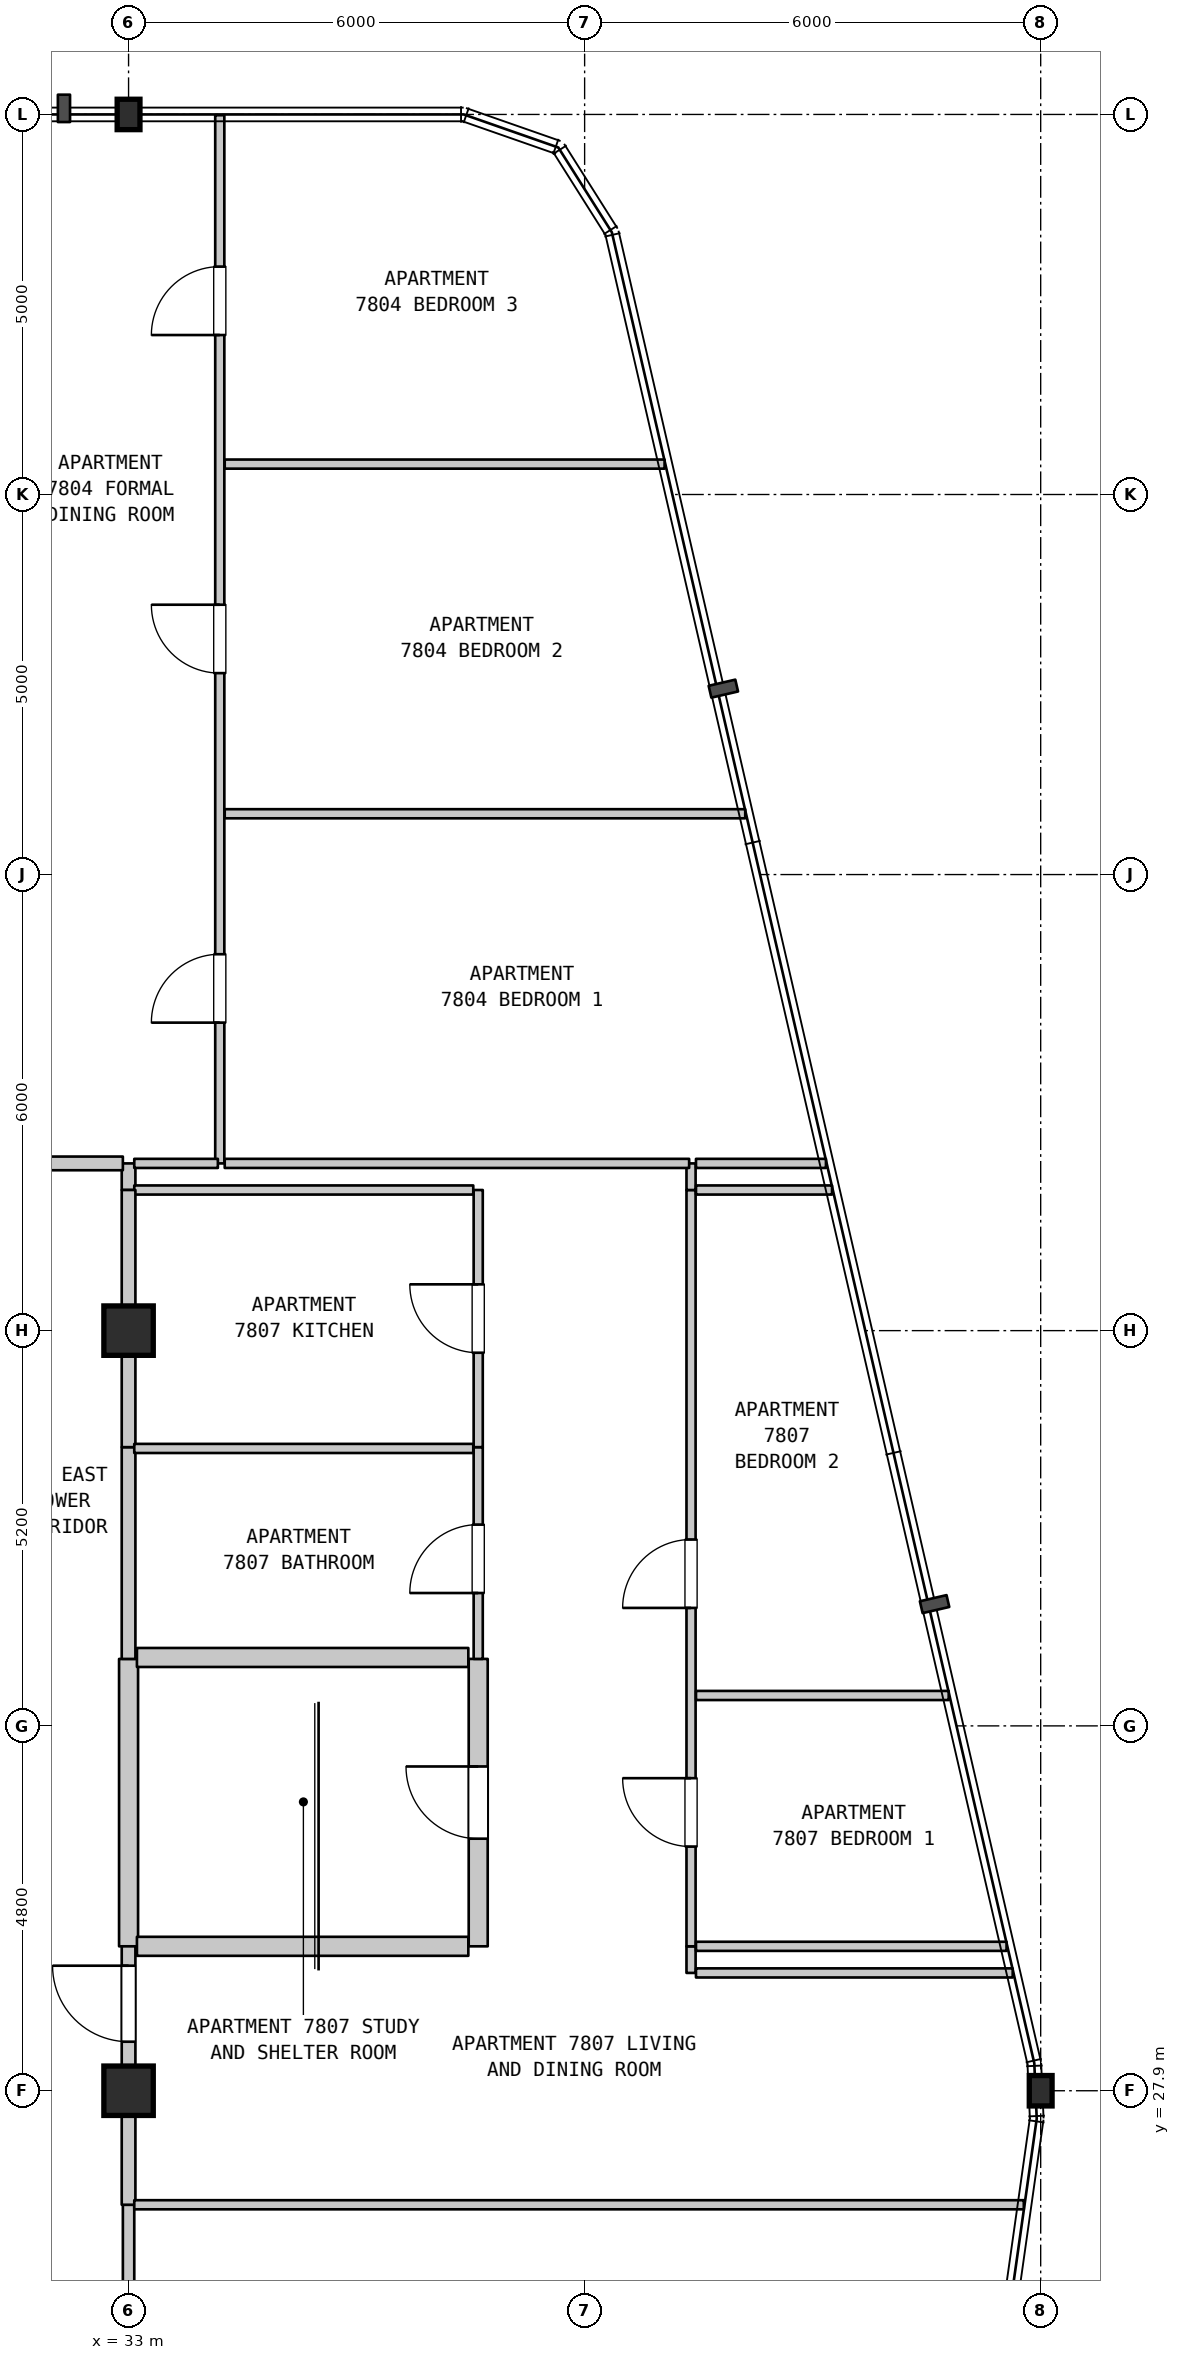
"""IFC4 building model, lengths in metres.
Left out: names, types, materials, properties, quantities, classifications, styles, units other than length and angle.
Written with IfcOpenShell. Run it as: python <this file> out.ifc"""

import sys

from ifc_helpers import new_model, si_unit, direction, frame, frame_2d, origin, origin_2d, place, context, subcontext, project, spatial, rectangle, i_section, extrude, element, fill, save


model = new_model("IFC4")
c1 = context("Model", 3, precision=1e-05, world=origin(), true_north=direction((0.0, 1.0)))
c2 = subcontext(c1, "Body", "Model", "MODEL_VIEW")
j1 = project(units=[si_unit("LENGTHUNIT", "METRE"), si_unit("PLANEANGLEUNIT", "RADIAN")], contexts=[c1])
p1 = place(None, origin())
s1 = spatial("IfcSite", under=j1, at=p1, CompositionType="ELEMENT")
p2 = place(p1, origin())
s2 = spatial("IfcBuilding", under=s1, at=p2, CompositionType="ELEMENT")
p3 = place(p2, frame((0.0, 0.0, 311.0)))
s3 = spatial("IfcBuildingStorey", under=s2, at=p3, CompositionType="ELEMENT", Elevation=311.0)
for number, where, z_axis, x_axis in (
    (1, (33.0, 27.9, 0.0), (0.0, 0.0, 1.0), (1.0, 0.0, 0.0)),
    (2, (33.0, 37.9, 0.0), (0.0, 0.0, 1.0), (1.0, 0.0, 0.0)),
):
    element("IfcColumn", number, at=place(p3, frame(where, z_axis=z_axis, x_axis=x_axis)), inside=s3, PredefinedType="COLUMN", context=c2, shape_type="SweptSolid", body=[
        extrude(rectangle(XDim=0.65, YDim=0.65, at=origin_2d()), origin(), (0.0, 0.0, 1.0), 3.7),
    ])
for number, where, z_axis, x_axis in (
    (3, (33.0, 53.9, 0.0), (0.0, 0.0, 1.0), (1.0, 0.0, 0.0)),
    (4, (45.0, 27.9, 0.0), (0.0, 0.0, 1.0), (1.0, 0.0, 0.0)),
):
    element("IfcColumn", number, at=place(p3, frame(where, z_axis=z_axis, x_axis=x_axis)), inside=s3, PredefinedType="COLUMN", context=c2, shape_type="SweptSolid", body=[
        extrude(i_section(OverallWidth=0.3, OverallDepth=0.4, WebThickness=0.013, FlangeThickness=0.024, FilletRadius=0.027, at=origin_2d()), origin(), (0.0, 0.0, 1.0), 3.7),
    ])
p4 = place(p3, frame((33.0, 19.5, 0.0), z_axis=(0.0, 0.0, 1.0), x_axis=(0.0, 1.0, 0.0)))
e5 = element("IfcWall", 5, at=p4, inside=s3, PredefinedType="STANDARD", context=c2, shape_type="SweptSolid", body=[
    extrude(rectangle(XDim=6.9, YDim=0.15, at=frame_2d((3.45, 0.0))), origin(), (0.0, 0.0, 1.0), 2.99),
])
p5 = place(p4, frame((3.944, 0.0, 0.0)))
e6 = element("IfcOpeningElement", 6, at=p5, cuts=e5, PredefinedType="OPENING", context=c2, shape_type="SweptSolid", body=[
    extrude(rectangle(XDim=1.0, YDim=2.15, at=frame_2d((0.5, 1.075))), frame((0.0, 0.085, 0.0), z_axis=(0.0, -1.0, 0.0), x_axis=(1.0, 0.0, 0.0)), (0.0, 0.0, 1.0), 0.17),
])
p6 = place(p3, frame((33.0, 26.4, 0.0), z_axis=(0.0, 0.0, 1.0), x_axis=(0.0, 1.0, 0.0)))
e7 = element("IfcWall", 7, at=p6, inside=s3, PredefinedType="STANDARD", context=c2, shape_type="SweptSolid", body=[
    extrude(rectangle(XDim=1.5, YDim=0.18, at=frame_2d((0.75, 0.0))), origin(), (0.0, 0.0, 1.0), 2.99),
])
p7 = place(p3, frame((33.0, 29.8, 0.0), z_axis=(0.0, 0.0, 1.0), x_axis=(0.0, 1.0, 0.0)))
e8 = element("IfcWall", 8, at=p7, inside=s3, PredefinedType="STANDARD", context=c2, shape_type="SweptSolid", body=[
    extrude(rectangle(XDim=3.781, YDim=0.25, at=frame_2d((1.891, 0.0))), origin(), (0.0, 0.0, 1.0), 2.78),
])
p8 = place(p3, frame((33.0, 33.581, 0.0), z_axis=(0.0, 0.0, 1.0), x_axis=(0.0, 1.0, 0.0)))
e9 = element("IfcWall", 9, at=p8, inside=s3, PredefinedType="STANDARD", context=c2, shape_type="SweptSolid", body=[
    extrude(rectangle(XDim=2.786, YDim=0.18, at=frame_2d((1.393, 0.0))), origin(), (0.0, 0.0, 1.0), 2.78),
])
p9 = place(p3, frame((33.0, 36.367, 0.0), z_axis=(0.0, 0.0, 1.0), x_axis=(0.0, 1.0, 0.0)))
e10 = element("IfcWall", 10, at=p9, inside=s3, PredefinedType="STANDARD", context=c2, shape_type="SweptSolid", body=[
    extrude(rectangle(XDim=1.533, YDim=0.18, at=frame_2d((0.767, 0.0))), origin(), (0.0, 0.0, 1.0), 2.78),
])
p10 = place(p3, frame((33.0, 39.75, 0.0), z_axis=(0.0, 0.0, 1.0), x_axis=(0.0, 1.0, 0.0)))
e11 = element("IfcWall", 11, at=p10, inside=s3, PredefinedType="STANDARD", context=c2, shape_type="SweptSolid", body=[
    extrude(rectangle(XDim=0.35, YDim=0.18, at=frame_2d((0.175, 0.0))), origin(), (0.0, 0.0, 1.0), 3.28),
])
p11 = place(p3, frame((34.2, 40.1, 0.0), z_axis=(0.0, 0.0, 1.0), x_axis=(0.0, 1.0, 0.0)))
e12 = element("IfcWall", 12, at=p11, inside=s3, PredefinedType="PARTITIONING", context=c2, shape_type="SweptSolid", body=[
    extrude(rectangle(XDim=13.79, YDim=0.12, at=frame_2d((6.895, 0.0))), origin(), (0.0, 0.0, 1.0), 3.28),
])
p12 = place(p11, frame((1.852, 0.0, 0.0)))
e13 = element("IfcOpeningElement", 13, at=p12, cuts=e12, PredefinedType="OPENING", context=c2, shape_type="SweptSolid", body=[
    extrude(rectangle(XDim=0.9, YDim=2.15, at=frame_2d((0.45, 1.075))), frame((0.0, 0.07, 0.0), z_axis=(0.0, -1.0, 0.0), x_axis=(1.0, 0.0, 0.0)), (0.0, 0.0, 1.0), 0.14),
])
p13 = place(p11, frame((6.45, 0.0, 0.0)))
e14 = element("IfcOpeningElement", 14, at=p13, cuts=e12, PredefinedType="OPENING", context=c2, shape_type="SweptSolid", body=[
    extrude(rectangle(XDim=0.9, YDim=2.15, at=frame_2d((0.45, 1.075))), frame((0.0, 0.07, 0.0), z_axis=(0.0, -1.0, 0.0), x_axis=(1.0, 0.0, 0.0)), (0.0, 0.0, 1.0), 0.14),
])
p14 = place(p11, frame((10.898, 0.0, 0.0)))
e15 = element("IfcOpeningElement", 15, at=p14, cuts=e12, PredefinedType="OPENING", context=c2, shape_type="SweptSolid", body=[
    extrude(rectangle(XDim=0.9, YDim=2.15, at=frame_2d((0.45, 1.075))), frame((0.0, 0.07, 0.0), z_axis=(0.0, -1.0, 0.0), x_axis=(1.0, 0.0, 0.0)), (0.0, 0.0, 1.0), 0.14),
])
p15 = place(p3, frame((37.6, 29.8, 0.0), z_axis=(0.0, 0.0, 1.0), x_axis=(0.0, 1.0, 0.0)))
e16 = element("IfcWall", 16, at=p15, inside=s3, PredefinedType="STANDARD", context=c2, shape_type="SweptSolid", body=[
    extrude(rectangle(XDim=3.781, YDim=0.25, at=frame_2d((1.891, 0.0))), origin(), (0.0, 0.0, 1.0), 3.28),
])
p16 = place(p15, frame((1.416, 0.0, 0.0)))
e17 = element("IfcOpeningElement", 17, at=p16, cuts=e16, PredefinedType="OPENING", context=c2, shape_type="SweptSolid", body=[
    extrude(rectangle(XDim=0.95, YDim=2.15, at=frame_2d((0.475, 1.075))), frame((0.0, 0.135, 0.0), z_axis=(0.0, -1.0, 0.0), x_axis=(1.0, 0.0, 0.0)), (0.0, 0.0, 1.0), 0.27),
])
p17 = place(p3, frame((37.6, 33.581, 0.0), z_axis=(0.0, 0.0, 1.0), x_axis=(0.0, 1.0, 0.0)))
e18 = element("IfcWall", 18, at=p17, inside=s3, PredefinedType="PARTITIONING", context=c2, shape_type="SweptSolid", body=[
    extrude(rectangle(XDim=2.786, YDim=0.12, at=frame_2d((1.393, 0.0))), origin(), (0.0, 0.0, 1.0), 3.28),
])
p18 = place(p17, frame((0.867, 0.0, 0.0)))
e19 = element("IfcOpeningElement", 19, at=p18, cuts=e18, PredefinedType="OPENING", context=c2, shape_type="SweptSolid", body=[
    extrude(rectangle(XDim=0.9, YDim=2.1, at=frame_2d((0.45, 1.05))), frame((0.0, 0.07, 0.0), z_axis=(0.0, -1.0, 0.0), x_axis=(1.0, 0.0, 0.0)), (0.0, 0.0, 1.0), 0.14),
])
p19 = place(p3, frame((37.6, 36.367, 0.0), z_axis=(0.0, 0.0, 1.0), x_axis=(0.0, 1.0, 0.0)))
e20 = element("IfcWall", 20, at=p19, inside=s3, PredefinedType="PARTITIONING", context=c2, shape_type="SweptSolid", body=[
    extrude(rectangle(XDim=3.383, YDim=0.12, at=frame_2d((1.691, 0.0))), origin(), (0.0, 0.0, 1.0), 3.28),
])
p20 = place(p19, frame((1.242, 0.0, 0.0)))
e21 = element("IfcOpeningElement", 21, at=p20, cuts=e20, PredefinedType="OPENING", context=c2, shape_type="SweptSolid", body=[
    extrude(rectangle(XDim=0.9, YDim=2.15, at=frame_2d((0.45, 1.075))), frame((0.0, 0.07, 0.0), z_axis=(0.0, -1.0, 0.0), x_axis=(1.0, 0.0, 0.0)), (0.0, 0.0, 1.0), 0.14),
])
p21 = place(p3, frame((40.4, 29.45, 0.0), z_axis=(0.0, 0.0, 1.0), x_axis=(0.0, 1.0, 0.0)))
e22 = element("IfcWall", 22, at=p21, inside=s3, PredefinedType="PARTITIONING", context=c2, shape_type="SweptSolid", body=[
    extrude(rectangle(XDim=0.35, YDim=0.12, at=frame_2d((0.175, 0.0))), origin(), (0.0, 0.0, 1.0), 3.28),
])
p22 = place(p3, frame((40.4, 29.8, 0.0), z_axis=(0.0, 0.0, 1.0), x_axis=(0.0, 1.0, 0.0)))
e23 = element("IfcWall", 23, at=p22, inside=s3, PredefinedType="PARTITIONING", context=c2, shape_type="SweptSolid", body=[
    extrude(rectangle(XDim=9.95, YDim=0.12, at=frame_2d((4.975, 0.0))), origin(), (0.0, 0.0, 1.0), 3.28),
])
p23 = place(p22, frame((1.312, 0.0, 0.0)))
e24 = element("IfcOpeningElement", 24, at=p23, cuts=e23, PredefinedType="OPENING", context=c2, shape_type="SweptSolid", body=[
    extrude(rectangle(XDim=0.9, YDim=2.15, at=frame_2d((0.45, 1.075))), frame((0.0, 0.07, 0.0), z_axis=(0.0, -1.0, 0.0), x_axis=(1.0, 0.0, 0.0)), (0.0, 0.0, 1.0), 0.14),
])
p24 = place(p22, frame((4.452, 0.0, 0.0)))
e25 = element("IfcOpeningElement", 25, at=p24, cuts=e23, PredefinedType="OPENING", context=c2, shape_type="SweptSolid", body=[
    extrude(rectangle(XDim=0.9, YDim=2.15, at=frame_2d((0.45, 1.075))), frame((0.0, 0.07, 0.0), z_axis=(0.0, -1.0, 0.0), x_axis=(1.0, 0.0, 0.0)), (0.0, 0.0, 1.0), 0.14),
])
p25 = place(p3, frame((40.4, 39.75, 0.0), z_axis=(0.0, 0.0, 1.0), x_axis=(0.0, 1.0, 0.0)))
e26 = element("IfcWall", 26, at=p25, inside=s3, PredefinedType="PARTITIONING", context=c2, shape_type="SweptSolid", body=[
    extrude(rectangle(XDim=0.35, YDim=0.12, at=frame_2d((0.175, 0.0))), origin(), (0.0, 0.0, 1.0), 3.28),
])
p26 = place(p3, frame((33.075, 26.4, 0.0), z_axis=(0.0, 0.0, 1.0), x_axis=(1.0, 0.0, 0.0)))
e27 = element("IfcWall", 27, at=p26, inside=s3, PredefinedType="PARTITIONING", context=c2, shape_type="SweptSolid", body=[
    extrude(rectangle(XDim=11.703, YDim=0.12, at=frame_2d((5.852, 0.0))), origin(), (0.0, 0.0, 1.0), 3.28),
])
p27 = place(p3, frame((40.465, 29.45, 0.0), z_axis=(0.0, 0.0, 1.0), x_axis=(1.0, 0.0, 0.0)))
e28 = element("IfcWall", 28, at=p27, inside=s3, PredefinedType="PARTITIONING", context=c2, shape_type="SweptSolid", body=[
    extrude(rectangle(XDim=4.167, YDim=0.12, at=frame_2d((2.083, 0.0))), origin(), (0.0, 0.0, 1.0), 3.28),
])
p28 = place(p3, frame((33.11, 29.8, 0.0), z_axis=(0.0, 0.0, 1.0), x_axis=(1.0, 0.0, 0.0)))
e29 = element("IfcWall", 29, at=p28, inside=s3, PredefinedType="STANDARD", context=c2, shape_type="SweptSolid", body=[
    extrude(rectangle(XDim=4.36, YDim=0.25, at=frame_2d((2.18, 0.0))), origin(), (0.0, 0.0, 1.0), 3.28),
])
p29 = place(p3, frame((40.465, 29.8, 0.0), z_axis=(0.0, 0.0, 1.0), x_axis=(1.0, 0.0, 0.0)))
e30 = element("IfcWall", 30, at=p29, inside=s3, PredefinedType="PARTITIONING", context=c2, shape_type="SweptSolid", body=[
    extrude(rectangle(XDim=4.086, YDim=0.12, at=frame_2d((2.043, 0.0))), origin(), (0.0, 0.0, 1.0), 3.28),
])
p30 = place(p3, frame((40.465, 33.1, 0.0), z_axis=(0.0, 0.0, 1.0), x_axis=(1.0, 0.0, 0.0)))
e31 = element("IfcWall", 31, at=p30, inside=s3, PredefinedType="PARTITIONING", context=c2, shape_type="SweptSolid", body=[
    extrude(rectangle(XDim=3.325, YDim=0.12, at=frame_2d((1.663, 0.0))), origin(), (0.0, 0.0, 1.0), 3.28),
])
p31 = place(p3, frame((33.11, 33.6, 0.0), z_axis=(0.0, 0.0, 1.0), x_axis=(1.0, 0.0, 0.0)))
e32 = element("IfcWall", 32, at=p31, inside=s3, PredefinedType="STANDARD", context=c2, shape_type="SweptSolid", body=[
    extrude(rectangle(XDim=4.36, YDim=0.25, at=frame_2d((2.18, 0.0))), origin(), (0.0, 0.0, 1.0), 3.28),
])
for number, where, z_axis, x_axis in (
    (33, (33.075, 36.35, 0.0), (0.0, 0.0, 1.0), (1.0, 0.0, 0.0)),
    (34, (33.075, 39.75, 0.0), (0.0, 0.0, 1.0), (1.0, 0.0, 0.0)),
):
    element("IfcWall", number, at=place(p3, frame(where, z_axis=z_axis, x_axis=x_axis)), inside=s3, PredefinedType="PARTITIONING", context=c2, shape_type="SweptSolid", body=[
        extrude(rectangle(XDim=4.46, YDim=0.12, at=frame_2d((2.23, 0.0))), origin(), (0.0, 0.0, 1.0), 3.28),
    ])
p32 = place(p3, frame((40.465, 39.75, 0.0), z_axis=(0.0, 0.0, 1.0), x_axis=(1.0, 0.0, 0.0)))
e35 = element("IfcWall", 35, at=p32, inside=s3, PredefinedType="PARTITIONING", context=c2, shape_type="SweptSolid", body=[
    extrude(rectangle(XDim=1.79, YDim=0.12, at=frame_2d((0.895, 0.0))), origin(), (0.0, 0.0, 1.0), 3.28),
])
p33 = place(p3, frame((29.195, 40.1, 0.0), z_axis=(0.0, 0.0, 1.0), x_axis=(1.0, 0.0, 0.0)))
e36 = element("IfcWall", 36, at=p33, inside=s3, PredefinedType="STANDARD", context=c2, shape_type="SweptSolid", body=[
    extrude(rectangle(XDim=3.73, YDim=0.18, at=frame_2d((1.865, 0.0))), origin(), (0.0, 0.0, 1.0), 3.28),
])
p34 = place(p3, frame((33.075, 40.1, 0.0), z_axis=(0.0, 0.0, 1.0), x_axis=(1.0, 0.0, 0.0)))
e37 = element("IfcWall", 37, at=p34, inside=s3, PredefinedType="PARTITIONING", context=c2, shape_type="SweptSolid", body=[
    extrude(rectangle(XDim=1.1, YDim=0.12, at=frame_2d((0.55, 0.0))), origin(), (0.0, 0.0, 1.0), 3.28),
])
p35 = place(p3, frame((34.265, 40.1, 0.0), z_axis=(0.0, 0.0, 1.0), x_axis=(1.0, 0.0, 0.0)))
e38 = element("IfcWall", 38, at=p35, inside=s3, PredefinedType="PARTITIONING", context=c2, shape_type="SweptSolid", body=[
    extrude(rectangle(XDim=6.11, YDim=0.12, at=frame_2d((3.055, 0.0))), origin(), (0.0, 0.0, 1.0), 3.28),
])
p36 = place(p3, frame((40.465, 40.1, 0.0), z_axis=(0.0, 0.0, 1.0), x_axis=(1.0, 0.0, 0.0)))
e39 = element("IfcWall", 39, at=p36, inside=s3, PredefinedType="PARTITIONING", context=c2, shape_type="SweptSolid", body=[
    extrude(rectangle(XDim=1.71, YDim=0.12, at=frame_2d((0.855, 0.0))), origin(), (0.0, 0.0, 1.0), 3.28),
])
p37 = place(p3, frame((34.265, 44.7, 0.0), z_axis=(0.0, 0.0, 1.0), x_axis=(1.0, 0.0, 0.0)))
e40 = element("IfcWall", 40, at=p37, inside=s3, PredefinedType="PARTITIONING", context=c2, shape_type="SweptSolid", body=[
    extrude(rectangle(XDim=6.848, YDim=0.12, at=frame_2d((3.424, 0.0))), origin(), (0.0, 0.0, 1.0), 3.28),
])
p38 = place(p3, frame((34.265, 49.3, 0.0), z_axis=(0.0, 0.0, 1.0), x_axis=(1.0, 0.0, 0.0)))
e41 = element("IfcWall", 41, at=p38, inside=s3, PredefinedType="PARTITIONING", context=c2, shape_type="SweptSolid", body=[
    extrude(rectangle(XDim=5.787, YDim=0.12, at=frame_2d((2.894, 0.0))), origin(), (0.0, 0.0, 1.0), 3.28),
])
p39 = place(p3, frame((33.0, 27.9, 0.0), z_axis=(0.0, 0.0, 1.0), x_axis=(0.0, 1.0, 0.0)))
e42 = element("IfcWall", 42, at=p39, inside=s3, PredefinedType="STANDARD", context=c2, shape_type="SweptSolid", body=[
    extrude(rectangle(XDim=1.9, YDim=0.18, at=frame_2d((0.95, 0.0))), origin(), (0.0, 0.0, 1.0), 2.78),
])
p40 = place(p39, frame((0.645, 0.0, 0.0)))
e43 = element("IfcOpeningElement", 43, at=p40, cuts=e42, PredefinedType="OPENING", context=c2, shape_type="SweptSolid", body=[
    extrude(rectangle(XDim=1.0, YDim=2.15, at=frame_2d((0.5, 1.075))), frame((0.0, 0.1, 0.0), z_axis=(0.0, -1.0, 0.0), x_axis=(1.0, 0.0, 0.0)), (0.0, 0.0, 1.0), 0.2),
])
p41 = place(p3, frame((33.0, 37.9, 0.0), z_axis=(0.0, 0.0, 1.0), x_axis=(0.0, 1.0, 0.0)))
e44 = element("IfcWall", 44, at=p41, inside=s3, PredefinedType="STANDARD", context=c2, shape_type="SweptSolid", body=[
    extrude(rectangle(XDim=1.85, YDim=0.18, at=frame_2d((0.925, 0.0))), origin(), (0.0, 0.0, 1.0), 2.68),
])
p42 = place(p40, origin())
e45 = element("IfcDoor", 45, at=p42, inside=s3, OperationType="SINGLE_SWING_RIGHT", PredefinedType="DOOR", context=c2, shape_type="SweptSolid", body=[
    extrude(rectangle(XDim=1.0, YDim=2.15, at=frame_2d((0.5, 1.075))), frame((0.0, 0.025, 0.0), z_axis=(0.0, -1.0, 0.0), x_axis=(1.0, 0.0, 0.0)), (0.0, 0.0, 1.0), 0.05),
])
fill(e43, e45)
p43 = place(p12, origin())
e46 = element("IfcDoor", 46, at=p43, inside=s3, OperationType="SINGLE_SWING_LEFT", PredefinedType="DOOR", context=c2, shape_type="SweptSolid", body=[
    extrude(rectangle(XDim=0.9, YDim=2.15, at=frame_2d((0.45, 1.075))), frame((0.0, 0.025, 0.0), z_axis=(0.0, -1.0, 0.0), x_axis=(1.0, 0.0, 0.0)), (0.0, 0.0, 1.0), 0.05),
])
fill(e13, e46)
p44 = place(p13, origin())
e47 = element("IfcDoor", 47, at=p44, inside=s3, OperationType="SINGLE_SWING_RIGHT", PredefinedType="DOOR", context=c2, shape_type="SweptSolid", body=[
    extrude(rectangle(XDim=0.9, YDim=2.15, at=frame_2d((0.45, 1.075))), frame((0.0, 0.025, 0.0), z_axis=(0.0, -1.0, 0.0), x_axis=(1.0, 0.0, 0.0)), (0.0, 0.0, 1.0), 0.05),
])
fill(e14, e47)
p45 = place(p14, origin())
e48 = element("IfcDoor", 48, at=p45, inside=s3, OperationType="SINGLE_SWING_LEFT", PredefinedType="DOOR", context=c2, shape_type="SweptSolid", body=[
    extrude(rectangle(XDim=0.9, YDim=2.15, at=frame_2d((0.45, 1.075))), frame((0.0, 0.025, 0.0), z_axis=(0.0, -1.0, 0.0), x_axis=(1.0, 0.0, 0.0)), (0.0, 0.0, 1.0), 0.05),
])
fill(e15, e48)
p46 = place(p16, origin())
e49 = element("IfcDoor", 49, at=p46, inside=s3, OperationType="SINGLE_SWING_RIGHT", PredefinedType="DOOR", context=c2, shape_type="SweptSolid", body=[
    extrude(rectangle(XDim=0.95, YDim=2.15, at=frame_2d((0.475, 1.075))), frame((0.0, 0.025, 0.0), z_axis=(0.0, -1.0, 0.0), x_axis=(1.0, 0.0, 0.0)), (0.0, 0.0, 1.0), 0.05),
])
fill(e17, e49)
p47 = place(p18, origin())
e50 = element("IfcDoor", 50, at=p47, inside=s3, OperationType="SINGLE_SWING_LEFT", PredefinedType="DOOR", context=c2, shape_type="SweptSolid", body=[
    extrude(rectangle(XDim=0.9, YDim=2.1, at=frame_2d((0.45, 1.05))), frame((0.0, 0.025, 0.0), z_axis=(0.0, -1.0, 0.0), x_axis=(1.0, 0.0, 0.0)), (0.0, 0.0, 1.0), 0.05),
])
fill(e19, e50)
p48 = place(p20, origin())
e51 = element("IfcDoor", 51, at=p48, inside=s3, OperationType="SINGLE_SWING_RIGHT", PredefinedType="DOOR", context=c2, shape_type="SweptSolid", body=[
    extrude(rectangle(XDim=0.9, YDim=2.15, at=frame_2d((0.45, 1.075))), frame((0.0, 0.025, 0.0), z_axis=(0.0, -1.0, 0.0), x_axis=(1.0, 0.0, 0.0)), (0.0, 0.0, 1.0), 0.05),
])
fill(e21, e51)
p49 = place(p23, origin())
e52 = element("IfcDoor", 52, at=p49, inside=s3, OperationType="SINGLE_SWING_RIGHT", PredefinedType="DOOR", context=c2, shape_type="SweptSolid", body=[
    extrude(rectangle(XDim=0.9, YDim=2.15, at=frame_2d((0.45, 1.075))), frame((0.0, 0.025, 0.0), z_axis=(0.0, -1.0, 0.0), x_axis=(1.0, 0.0, 0.0)), (0.0, 0.0, 1.0), 0.05),
])
fill(e24, e52)
p50 = place(p24, origin())
e53 = element("IfcDoor", 53, at=p50, inside=s3, OperationType="SINGLE_SWING_LEFT", PredefinedType="DOOR", context=c2, shape_type="SweptSolid", body=[
    extrude(rectangle(XDim=0.9, YDim=2.15, at=frame_2d((0.45, 1.075))), frame((0.0, 0.025, 0.0), z_axis=(0.0, -1.0, 0.0), x_axis=(1.0, 0.0, 0.0)), (0.0, 0.0, 1.0), 0.05),
])
fill(e25, e53)
save(model, sys.argv[1])
